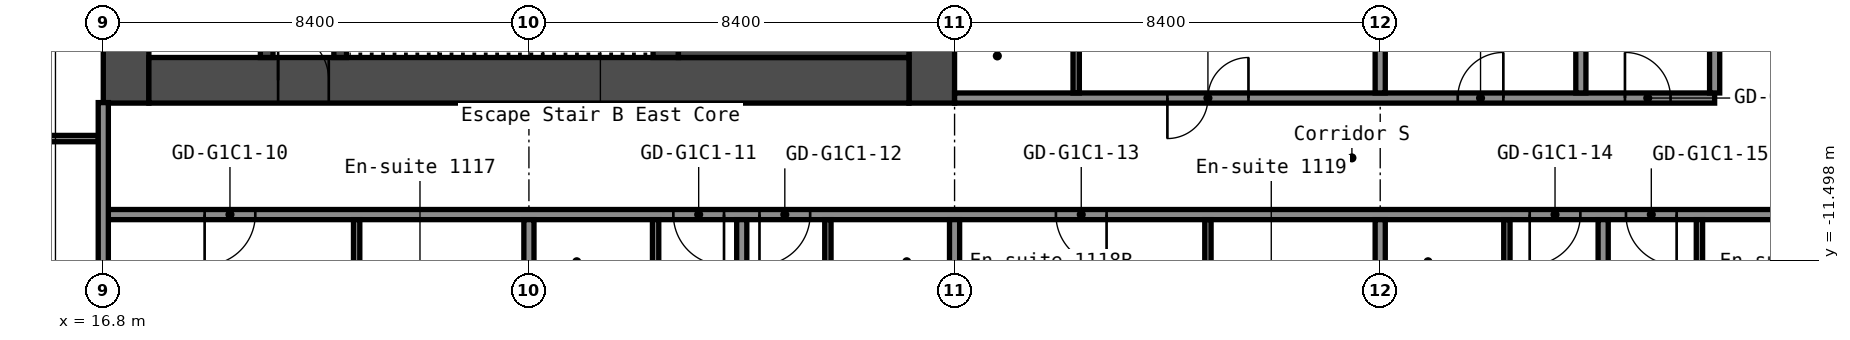
"""IFC4 building model, lengths in metres.
Left out: names, types, materials, properties, quantities, classifications, styles, units other than length and angle.
Written with IfcOpenShell. Run it as: python <this file> out.ifc"""

import sys

from ifc_helpers import new_model, si_unit, direction, frame, frame_2d, origin, place, context, subcontext, project, spatial, rectangle, extrude, element, fill, save


model = new_model("IFC4")
c1 = context("Model", 3, precision=1e-05, world=origin(), true_north=direction((0.0, 1.0)))
c2 = subcontext(c1, "Body", "Model", "MODEL_VIEW")
j1 = project(units=[si_unit("LENGTHUNIT", "METRE"), si_unit("PLANEANGLEUNIT", "RADIAN")], contexts=[c1])
p1 = place(None, origin())
s1 = spatial("IfcSite", under=j1, at=p1, CompositionType="ELEMENT")
p2 = place(p1, origin())
s2 = spatial("IfcBuilding", under=s1, at=p2, CompositionType="ELEMENT")
p3 = place(p2, frame((0.0, 0.0, 42.2)))
s3 = spatial("IfcBuildingStorey", under=s2, at=p3, CompositionType="ELEMENT", Elevation=42.2)
p4 = place(p3, frame((17.25, -8.4, 0.0), z_axis=(0.0, 0.0, 1.0), x_axis=(0.0, 1.0, 0.0)))
e1 = element("IfcWall", 1, at=p4, inside=s3, PredefinedType="SHEAR", context=c2, shape_type="SweptSolid", body=[
    extrude(rectangle(XDim=16.8, YDim=0.9, at=frame_2d((8.4, 0.0))), origin(), (0.0, 0.0, 1.0), 2.8),
])
p5 = place(p4, frame((12.75, 0.0, 0.0)))
e2 = element("IfcOpeningElement", 2, at=p5, cuts=e1, PredefinedType="OPENING", context=c2, shape_type="SweptSolid", body=[
    extrude(rectangle(XDim=1.2, YDim=2.1, at=frame_2d((0.6, 1.05))), frame((0.0, 0.46, 0.0), z_axis=(0.0, -1.0, 0.0), x_axis=(1.0, 0.0, 0.0)), (0.0, 0.0, 1.0), 0.92),
])
p6 = place(p4, frame((2.85, 0.0, 0.0)))
e3 = element("IfcOpeningElement", 3, at=p6, cuts=e1, PredefinedType="OPENING", context=c2, shape_type="SweptSolid", body=[
    extrude(rectangle(XDim=1.2, YDim=2.1, at=frame_2d((0.6, 1.05))), frame((0.0, 0.46, 0.0), z_axis=(0.0, -1.0, 0.0), x_axis=(1.0, 0.0, 0.0)), (0.0, 0.0, 1.0), 0.92),
])
p7 = place(p3, frame((33.15, -8.4, 0.0), z_axis=(0.0, 0.0, 1.0), x_axis=(0.0, 1.0, 0.0)))
e4 = element("IfcWall", 4, at=p7, inside=s3, PredefinedType="SHEAR", context=c2, shape_type="SweptSolid", body=[
    extrude(rectangle(XDim=16.8, YDim=0.9, at=frame_2d((8.4, 0.0))), origin(), (0.0, 0.0, 1.0), 2.8),
])
p8 = place(p3, frame((17.7, -7.95, 0.0), z_axis=(0.0, 0.0, 1.0), x_axis=(1.0, 0.0, 0.0)))
e5 = element("IfcWall", 5, at=p8, inside=s3, PredefinedType="SHEAR", context=c2, shape_type="SweptSolid", body=[
    extrude(rectangle(XDim=15.0, YDim=0.9, at=frame_2d((7.5, 0.0))), origin(), (0.0, 0.0, 1.0), 2.8),
])
p9 = place(p8, frame((2.55, 0.0, 0.0)))
e6 = element("IfcOpeningElement", 6, at=p9, cuts=e5, PredefinedType="OPENING", context=c2, shape_type="SweptSolid", body=[
    extrude(rectangle(XDim=1.0, YDim=2.1, at=frame_2d((0.5, 1.05))), frame((0.0, 0.46, 0.0), z_axis=(0.0, -1.0, 0.0), x_axis=(1.0, 0.0, 0.0)), (0.0, 0.0, 1.0), 0.92),
])
p10 = place(p3, frame((20.025, -7.5, 0.0), z_axis=(0.0, 0.0, 1.0), x_axis=(0.0, 1.0, 0.0)))
e7 = element("IfcWall", 7, at=p10, inside=s3, PredefinedType="SHEAR", context=c2, shape_type="SweptSolid", body=[
    extrude(rectangle(XDim=6.3, YDim=0.25, at=frame_2d((3.15, 0.0))), origin(), (0.0, 0.0, 1.0), 2.8),
])
p11 = place(p10, frame((2.4, 0.0, 0.0)))
e8 = element("IfcOpeningElement", 8, at=p11, cuts=e7, PredefinedType="OPENING", context=c2, shape_type="SweptSolid", body=[
    extrude(rectangle(XDim=1.0, YDim=2.1, at=frame_2d((0.5, 1.05))), frame((0.0, 0.135, 0.0), z_axis=(0.0, -1.0, 0.0), x_axis=(1.0, 0.0, 0.0)), (0.0, 0.0, 1.0), 0.27),
])
p12 = place(p3, frame((21.475, -7.5, 0.0), z_axis=(0.0, 0.0, 1.0), x_axis=(0.0, 1.0, 0.0)))
e9 = element("IfcWall", 9, at=p12, inside=s3, PredefinedType="SHEAR", context=c2, shape_type="SweptSolid", body=[
    extrude(rectangle(XDim=3.75, YDim=0.25, at=frame_2d((1.875, 0.0))), origin(), (0.0, 0.0, 1.0), 2.8),
])
p13 = place(p12, frame((1.3, 0.0, 0.0)))
e10 = element("IfcOpeningElement", 10, at=p13, cuts=e9, PredefinedType="OPENING", context=c2, shape_type="SweptSolid", body=[
    extrude(rectangle(XDim=1.2, YDim=2.1, at=frame_2d((0.6, 1.05))), frame((0.0, 0.135, 0.0), z_axis=(0.0, -1.0, 0.0), x_axis=(1.0, 0.0, 0.0)), (0.0, 0.0, 1.0), 0.27),
])
p14 = place(p3, frame((27.9, -7.5, 0.0), z_axis=(0.0, 0.0, 1.0), x_axis=(0.0, 1.0, 0.0)))
e11 = element("IfcWall", 11, at=p14, inside=s3, PredefinedType="SHEAR", context=c2, shape_type="SweptSolid", body=[
    extrude(rectangle(XDim=3.75, YDim=0.5, at=frame_2d((1.875, 0.0))), origin(), (0.0, 0.0, 1.0), 2.8),
])
p15 = place(p3, frame((28.15, -6.75, 0.0), z_axis=(0.0, 0.0, 1.0), x_axis=(1.0, 0.0, 0.0)))
e12 = element("IfcWall", 12, at=p15, inside=s3, PredefinedType="SHEAR", context=c2, shape_type="SweptSolid", body=[
    extrude(rectangle(XDim=4.55, YDim=1.5, at=frame_2d((2.275, 0.0))), origin(), (0.0, 0.0, 1.0), 2.8),
])
p16 = place(p3, frame((16.8, -10.6, 0.0), z_axis=(0.0, 0.0, 1.0), x_axis=(1.0, 0.0, 0.0)))
e13 = element("IfcWall", 13, at=p16, inside=s3, PredefinedType="PARTITIONING", context=c2, shape_type="SweptSolid", body=[
    extrude(rectangle(XDim=34.3, YDim=0.2, at=frame_2d((17.15, 0.0))), origin(), (0.0, 0.0, 1.0), 2.8),
])
p17 = place(p16, frame((2.0, 0.0, 0.0)))
e14 = element("IfcOpeningElement", 14, at=p17, cuts=e13, PredefinedType="OPENING", context=c2, shape_type="SweptSolid", body=[
    extrude(rectangle(XDim=1.0, YDim=2.1, at=frame_2d((0.5, 1.05))), frame((0.0, 0.11, 0.0), z_axis=(0.0, -1.0, 0.0), x_axis=(1.0, 0.0, 0.0)), (0.0, 0.0, 1.0), 0.22),
])
p18 = place(p16, frame((11.25, 0.0, 0.0)))
e15 = element("IfcOpeningElement", 15, at=p18, cuts=e13, PredefinedType="OPENING", context=c2, shape_type="SweptSolid", body=[
    extrude(rectangle(XDim=1.0, YDim=2.1, at=frame_2d((0.5, 1.05))), frame((0.0, 0.11, 0.0), z_axis=(0.0, -1.0, 0.0), x_axis=(1.0, 0.0, 0.0)), (0.0, 0.0, 1.0), 0.22),
])
p19 = place(p16, frame((12.95, 0.0, 0.0)))
e16 = element("IfcOpeningElement", 16, at=p19, cuts=e13, PredefinedType="OPENING", context=c2, shape_type="SweptSolid", body=[
    extrude(rectangle(XDim=1.0, YDim=2.1, at=frame_2d((0.5, 1.05))), frame((0.0, 0.11, 0.0), z_axis=(0.0, -1.0, 0.0), x_axis=(1.0, 0.0, 0.0)), (0.0, 0.0, 1.0), 0.22),
])
p20 = place(p16, frame((18.8, 0.0, 0.0)))
e17 = element("IfcOpeningElement", 17, at=p20, cuts=e13, PredefinedType="OPENING", context=c2, shape_type="SweptSolid", body=[
    extrude(rectangle(XDim=1.0, YDim=2.1, at=frame_2d((0.5, 1.05))), frame((0.0, 0.11, 0.0), z_axis=(0.0, -1.0, 0.0), x_axis=(1.0, 0.0, 0.0)), (0.0, 0.0, 1.0), 0.22),
])
p21 = place(p16, frame((28.15, 0.0, 0.0)))
e18 = element("IfcOpeningElement", 18, at=p21, cuts=e13, PredefinedType="OPENING", context=c2, shape_type="SweptSolid", body=[
    extrude(rectangle(XDim=1.0, YDim=2.1, at=frame_2d((0.5, 1.05))), frame((0.0, 0.11, 0.0), z_axis=(0.0, -1.0, 0.0), x_axis=(1.0, 0.0, 0.0)), (0.0, 0.0, 1.0), 0.22),
])
p22 = place(p16, frame((30.05, 0.0, 0.0)))
e19 = element("IfcOpeningElement", 19, at=p22, cuts=e13, PredefinedType="OPENING", context=c2, shape_type="SweptSolid", body=[
    extrude(rectangle(XDim=1.0, YDim=2.1, at=frame_2d((0.5, 1.05))), frame((0.0, 0.11, 0.0), z_axis=(0.0, -1.0, 0.0), x_axis=(1.0, 0.0, 0.0)), (0.0, 0.0, 1.0), 0.22),
])
p23 = place(p3, frame((14.363, -9.1, 0.0), z_axis=(0.0, 0.0, 1.0), x_axis=(1.0, 0.0, 0.0)))
e20 = element("IfcWall", 20, at=p23, inside=s3, PredefinedType="PARTITIONING", context=c2, shape_type="SweptSolid", body=[
    extrude(rectangle(XDim=2.337, YDim=0.125, at=frame_2d((1.169, 0.0))), origin(), (0.0, 0.0, 1.0), 2.8),
])
p24 = place(p3, frame((33.6, -8.3, 0.0), z_axis=(0.0, 0.0, 1.0), x_axis=(1.0, 0.0, 0.0)))
e21 = element("IfcWall", 21, at=p24, inside=s3, PredefinedType="PARTITIONING", context=c2, shape_type="SweptSolid", body=[
    extrude(rectangle(XDim=15.0, YDim=0.2, at=frame_2d((7.5, 0.0))), origin(), (0.0, 0.0, 1.0), 2.8),
])
p25 = place(p24, frame((4.2, 0.0, 0.0)))
e22 = element("IfcOpeningElement", 22, at=p25, cuts=e21, PredefinedType="OPENING", context=c2, shape_type="SweptSolid", body=[
    extrude(rectangle(XDim=1.6, YDim=2.1, at=frame_2d((0.8, 1.05))), frame((0.0, 0.11, 0.0), z_axis=(0.0, -1.0, 0.0), x_axis=(1.0, 0.0, 0.0)), (0.0, 0.0, 1.0), 0.22),
])
p26 = place(p24, frame((9.93, 0.0, 0.0)))
e23 = element("IfcOpeningElement", 23, at=p26, cuts=e21, PredefinedType="OPENING", context=c2, shape_type="SweptSolid", body=[
    extrude(rectangle(XDim=0.9, YDim=2.1, at=frame_2d((0.45, 1.05))), frame((0.0, 0.11, 0.0), z_axis=(0.0, -1.0, 0.0), x_axis=(1.0, 0.0, 0.0)), (0.0, 0.0, 1.0), 0.22),
])
p27 = place(p24, frame((13.23, 0.0, 0.0)))
e24 = element("IfcOpeningElement", 24, at=p27, cuts=e21, PredefinedType="OPENING", context=c2, shape_type="SweptSolid", body=[
    extrude(rectangle(XDim=0.9, YDim=2.1, at=frame_2d((0.45, 1.05))), frame((0.0, 0.11, 0.0), z_axis=(0.0, -1.0, 0.0), x_axis=(1.0, 0.0, 0.0)), (0.0, 0.0, 1.0), 0.22),
])
p28 = place(p3, frame((16.8, -20.3, 0.0), z_axis=(0.0, 0.0, 1.0), x_axis=(0.0, 1.0, 0.0)))
e25 = element("IfcWall", 25, at=p28, inside=s3, PredefinedType="PARTITIONING", context=c2, shape_type="SweptSolid", body=[
    extrude(rectangle(XDim=11.91, YDim=0.2, at=frame_2d((5.955, 0.0))), origin(), (0.0, 0.0, 1.0), 2.8),
])
p29 = place(p3, frame((21.8, -14.0, 0.0), z_axis=(0.0, 0.0, 1.0), x_axis=(0.0, 1.0, 0.0)))
e26 = element("IfcWall", 26, at=p29, inside=s3, PredefinedType="PARTITIONING", context=c2, shape_type="SweptSolid", body=[
    extrude(rectangle(XDim=3.3, YDim=0.125, at=frame_2d((1.65, 0.0))), origin(), (0.0, 0.0, 1.0), 2.8),
])
p30 = place(p3, frame((25.2, -20.3, 0.0), z_axis=(0.0, 0.0, 1.0), x_axis=(0.0, 1.0, 0.0)))
e27 = element("IfcWall", 27, at=p30, inside=s3, PredefinedType="PARTITIONING", context=c2, shape_type="SweptSolid", body=[
    extrude(rectangle(XDim=9.6, YDim=0.2, at=frame_2d((4.8, 0.0))), origin(), (0.0, 0.0, 1.0), 2.8),
])
p31 = place(p3, frame((27.7, -13.6, 0.0), z_axis=(0.0, 0.0, 1.0), x_axis=(0.0, 1.0, 0.0)))
e28 = element("IfcWall", 28, at=p31, inside=s3, PredefinedType="PARTITIONING", context=c2, shape_type="SweptSolid", body=[
    extrude(rectangle(XDim=2.9, YDim=0.125, at=frame_2d((1.45, 0.0))), origin(), (0.0, 0.0, 1.0), 2.8),
])
p32 = place(p31, frame((0.6, 0.0, 0.0)))
e29 = element("IfcOpeningElement", 29, at=p32, cuts=e28, PredefinedType="OPENING", context=c2, shape_type="SweptSolid", body=[
    extrude(rectangle(XDim=0.8, YDim=2.1, at=frame_2d((0.4, 1.05))), frame((0.0, 0.073, 0.0), z_axis=(0.0, -1.0, 0.0), x_axis=(1.0, 0.0, 0.0)), (0.0, 0.0, 1.0), 0.145),
])
p33 = place(p3, frame((29.4, -20.3, 0.0), z_axis=(0.0, 0.0, 1.0), x_axis=(0.0, 1.0, 0.0)))
e30 = element("IfcWall", 30, at=p33, inside=s3, PredefinedType="PARTITIONING", context=c2, shape_type="SweptSolid", body=[
    extrude(rectangle(XDim=9.6, YDim=0.2, at=frame_2d((4.8, 0.0))), origin(), (0.0, 0.0, 1.0), 2.8),
])
p34 = place(p3, frame((31.1, -13.6, 0.0), z_axis=(0.0, 0.0, 1.0), x_axis=(0.0, 1.0, 0.0)))
e31 = element("IfcWall", 31, at=p34, inside=s3, PredefinedType="PARTITIONING", context=c2, shape_type="SweptSolid", body=[
    extrude(rectangle(XDim=2.9, YDim=0.125, at=frame_2d((1.45, 0.0))), origin(), (0.0, 0.0, 1.0), 2.8),
])
p35 = place(p34, frame((0.6, 0.0, 0.0)))
e32 = element("IfcOpeningElement", 32, at=p35, cuts=e31, PredefinedType="OPENING", context=c2, shape_type="SweptSolid", body=[
    extrude(rectangle(XDim=0.8, YDim=2.1, at=frame_2d((0.4, 1.05))), frame((0.0, 0.073, 0.0), z_axis=(0.0, -1.0, 0.0), x_axis=(1.0, 0.0, 0.0)), (0.0, 0.0, 1.0), 0.145),
])
p36 = place(p3, frame((33.6, -20.3, 0.0), z_axis=(0.0, 0.0, 1.0), x_axis=(0.0, 1.0, 0.0)))
e33 = element("IfcWall", 33, at=p36, inside=s3, PredefinedType="PARTITIONING", context=c2, shape_type="SweptSolid", body=[
    extrude(rectangle(XDim=9.6, YDim=0.2, at=frame_2d((4.8, 0.0))), origin(), (0.0, 0.0, 1.0), 2.8),
])
p37 = place(p3, frame((36.0, -8.2, 0.0), z_axis=(0.0, 0.0, 1.0), x_axis=(0.0, 1.0, 0.0)))
e34 = element("IfcWall", 34, at=p37, inside=s3, PredefinedType="PARTITIONING", context=c2, shape_type="SweptSolid", body=[
    extrude(rectangle(XDim=2.5, YDim=0.125, at=frame_2d((1.25, 0.0))), origin(), (0.0, 0.0, 1.0), 2.8),
])
p38 = place(p37, frame((1.05, 0.0, 0.0)))
e35 = element("IfcOpeningElement", 35, at=p38, cuts=e34, PredefinedType="OPENING", context=c2, shape_type="SweptSolid", body=[
    extrude(rectangle(XDim=0.9, YDim=2.1, at=frame_2d((0.45, 1.05))), frame((0.0, 0.073, 0.0), z_axis=(0.0, -1.0, 0.0), x_axis=(1.0, 0.0, 0.0)), (0.0, 0.0, 1.0), 0.145),
])
p39 = place(p3, frame((38.6, -14.0, 0.0), z_axis=(0.0, 0.0, 1.0), x_axis=(0.0, 1.0, 0.0)))
e36 = element("IfcWall", 36, at=p39, inside=s3, PredefinedType="PARTITIONING", context=c2, shape_type="SweptSolid", body=[
    extrude(rectangle(XDim=3.3, YDim=0.125, at=frame_2d((1.65, 0.0))), origin(), (0.0, 0.0, 1.0), 2.8),
])
p40 = place(p3, frame((42.0, -20.3, 0.0), z_axis=(0.0, 0.0, 1.0), x_axis=(0.0, 1.0, 0.0)))
e37 = element("IfcWall", 37, at=p40, inside=s3, PredefinedType="PARTITIONING", context=c2, shape_type="SweptSolid", body=[
    extrude(rectangle(XDim=9.6, YDim=0.2, at=frame_2d((4.8, 0.0))), origin(), (0.0, 0.0, 1.0), 2.8),
])
p41 = place(p3, frame((42.0, -8.2, 0.0), z_axis=(0.0, 0.0, 1.0), x_axis=(0.0, 1.0, 0.0)))
e38 = element("IfcWall", 38, at=p41, inside=s3, PredefinedType="PARTITIONING", context=c2, shape_type="SweptSolid", body=[
    extrude(rectangle(XDim=8.2, YDim=0.2, at=frame_2d((4.1, 0.0))), origin(), (0.0, 0.0, 1.0), 2.8),
])
p42 = place(p3, frame((44.5, -13.6, 0.0), z_axis=(0.0, 0.0, 1.0), x_axis=(0.0, 1.0, 0.0)))
e39 = element("IfcWall", 39, at=p42, inside=s3, PredefinedType="PARTITIONING", context=c2, shape_type="SweptSolid", body=[
    extrude(rectangle(XDim=2.9, YDim=0.125, at=frame_2d((1.45, 0.0))), origin(), (0.0, 0.0, 1.0), 2.8),
])
p43 = place(p42, frame((0.6, 0.0, 0.0)))
e40 = element("IfcOpeningElement", 40, at=p43, cuts=e39, PredefinedType="OPENING", context=c2, shape_type="SweptSolid", body=[
    extrude(rectangle(XDim=0.8, YDim=2.1, at=frame_2d((0.4, 1.05))), frame((0.0, 0.073, 0.0), z_axis=(0.0, -1.0, 0.0), x_axis=(1.0, 0.0, 0.0)), (0.0, 0.0, 1.0), 0.145),
])
p44 = place(p3, frame((45.96, -8.2, 0.0), z_axis=(0.0, 0.0, 1.0), x_axis=(0.0, 1.0, 0.0)))
e41 = element("IfcWall", 41, at=p44, inside=s3, PredefinedType="PARTITIONING", context=c2, shape_type="SweptSolid", body=[
    extrude(rectangle(XDim=8.2, YDim=0.2, at=frame_2d((4.1, 0.0))), origin(), (0.0, 0.0, 1.0), 2.8),
])
p45 = place(p3, frame((46.4, -20.3, 0.0), z_axis=(0.0, 0.0, 1.0), x_axis=(0.0, 1.0, 0.0)))
e42 = element("IfcWall", 42, at=p45, inside=s3, PredefinedType="PARTITIONING", context=c2, shape_type="SweptSolid", body=[
    extrude(rectangle(XDim=9.6, YDim=0.2, at=frame_2d((4.8, 0.0))), origin(), (0.0, 0.0, 1.0), 2.8),
])
p46 = place(p3, frame((48.3, -13.6, 0.0), z_axis=(0.0, 0.0, 1.0), x_axis=(0.0, 1.0, 0.0)))
e43 = element("IfcWall", 43, at=p46, inside=s3, PredefinedType="PARTITIONING", context=c2, shape_type="SweptSolid", body=[
    extrude(rectangle(XDim=2.9, YDim=0.125, at=frame_2d((1.45, 0.0))), origin(), (0.0, 0.0, 1.0), 2.8),
])
p47 = place(p46, frame((0.6, 0.0, 0.0)))
e44 = element("IfcOpeningElement", 44, at=p47, cuts=e43, PredefinedType="OPENING", context=c2, shape_type="SweptSolid", body=[
    extrude(rectangle(XDim=0.8, YDim=2.1, at=frame_2d((0.4, 1.05))), frame((0.0, 0.073, 0.0), z_axis=(0.0, -1.0, 0.0), x_axis=(1.0, 0.0, 0.0)), (0.0, 0.0, 1.0), 0.145),
])
p48 = place(p3, frame((48.6, -8.2, 0.0), z_axis=(0.0, 0.0, 1.0), x_axis=(0.0, 1.0, 0.0)))
e45 = element("IfcWall", 45, at=p48, inside=s3, PredefinedType="PARTITIONING", context=c2, shape_type="SweptSolid", body=[
    extrude(rectangle(XDim=16.4, YDim=0.2, at=frame_2d((8.2, 0.0))), origin(), (0.0, 0.0, 1.0), 2.8),
])
p49 = place(p9, origin())
e46 = element("IfcDoor", 46, at=p49, inside=s3, OperationType="SINGLE_SWING_RIGHT", PredefinedType="DOOR", context=c2, shape_type="SweptSolid", body=[
    extrude(rectangle(XDim=1.0, YDim=2.1, at=frame_2d((0.5, 1.05))), frame((0.0, 0.025, 0.0), z_axis=(0.0, -1.0, 0.0), x_axis=(1.0, 0.0, 0.0)), (0.0, 0.0, 1.0), 0.05),
])
fill(e6, e46)
p50 = place(p17, origin())
e47 = element("IfcDoor", 47, at=p50, inside=s3, OperationType="SINGLE_SWING_LEFT", PredefinedType="DOOR", context=c2, shape_type="SweptSolid", body=[
    extrude(rectangle(XDim=1.0, YDim=2.1, at=frame_2d((0.5, 1.05))), frame((0.0, 0.025, 0.0), z_axis=(0.0, -1.0, 0.0), x_axis=(1.0, 0.0, 0.0)), (0.0, 0.0, 1.0), 0.05),
])
fill(e14, e47)
p51 = place(p18, origin())
e48 = element("IfcDoor", 48, at=p51, inside=s3, OperationType="SINGLE_SWING_RIGHT", PredefinedType="DOOR", context=c2, shape_type="SweptSolid", body=[
    extrude(rectangle(XDim=1.0, YDim=2.1, at=frame_2d((0.5, 1.05))), frame((0.0, 0.025, 0.0), z_axis=(0.0, -1.0, 0.0), x_axis=(1.0, 0.0, 0.0)), (0.0, 0.0, 1.0), 0.05),
])
fill(e15, e48)
p52 = place(p19, origin())
e49 = element("IfcDoor", 49, at=p52, inside=s3, OperationType="SINGLE_SWING_LEFT", PredefinedType="DOOR", context=c2, shape_type="SweptSolid", body=[
    extrude(rectangle(XDim=1.0, YDim=2.1, at=frame_2d((0.5, 1.05))), frame((0.0, 0.025, 0.0), z_axis=(0.0, -1.0, 0.0), x_axis=(1.0, 0.0, 0.0)), (0.0, 0.0, 1.0), 0.05),
])
fill(e16, e49)
p53 = place(p20, origin())
e50 = element("IfcDoor", 50, at=p53, inside=s3, OperationType="SINGLE_SWING_RIGHT", PredefinedType="DOOR", context=c2, shape_type="SweptSolid", body=[
    extrude(rectangle(XDim=1.0, YDim=2.1, at=frame_2d((0.5, 1.05))), frame((0.0, 0.025, 0.0), z_axis=(0.0, -1.0, 0.0), x_axis=(1.0, 0.0, 0.0)), (0.0, 0.0, 1.0), 0.05),
])
fill(e17, e50)
p54 = place(p21, origin())
e51 = element("IfcDoor", 51, at=p54, inside=s3, OperationType="SINGLE_SWING_LEFT", PredefinedType="DOOR", context=c2, shape_type="SweptSolid", body=[
    extrude(rectangle(XDim=1.0, YDim=2.1, at=frame_2d((0.5, 1.05))), frame((0.0, 0.025, 0.0), z_axis=(0.0, -1.0, 0.0), x_axis=(1.0, 0.0, 0.0)), (0.0, 0.0, 1.0), 0.05),
])
fill(e18, e51)
p55 = place(p22, origin())
e52 = element("IfcDoor", 52, at=p55, inside=s3, OperationType="SINGLE_SWING_RIGHT", PredefinedType="DOOR", context=c2, shape_type="SweptSolid", body=[
    extrude(rectangle(XDim=1.0, YDim=2.1, at=frame_2d((0.5, 1.05))), frame((0.0, 0.025, 0.0), z_axis=(0.0, -1.0, 0.0), x_axis=(1.0, 0.0, 0.0)), (0.0, 0.0, 1.0), 0.05),
])
fill(e19, e52)
p56 = place(p25, origin())
e53 = element("IfcDoor", 53, at=p56, inside=s3, OperationType="DOUBLE_DOOR_SINGLE_SWING", PredefinedType="DOOR", context=c2, shape_type="SweptSolid", body=[
    extrude(rectangle(XDim=1.6, YDim=2.1, at=frame_2d((0.8, 1.05))), frame((0.0, 0.025, 0.0), z_axis=(0.0, -1.0, 0.0), x_axis=(1.0, 0.0, 0.0)), (0.0, 0.0, 1.0), 0.05),
])
fill(e22, e53)
p57 = place(p26, origin())
e54 = element("IfcDoor", 54, at=p57, inside=s3, OperationType="SINGLE_SWING_LEFT", PredefinedType="DOOR", context=c2, shape_type="SweptSolid", body=[
    extrude(rectangle(XDim=0.9, YDim=2.1, at=frame_2d((0.45, 1.05))), frame((0.0, 0.025, 0.0), z_axis=(0.0, -1.0, 0.0), x_axis=(1.0, 0.0, 0.0)), (0.0, 0.0, 1.0), 0.05),
])
fill(e23, e54)
p58 = place(p27, origin())
e55 = element("IfcDoor", 55, at=p58, inside=s3, OperationType="SINGLE_SWING_RIGHT", PredefinedType="DOOR", context=c2, shape_type="SweptSolid", body=[
    extrude(rectangle(XDim=0.9, YDim=2.1, at=frame_2d((0.45, 1.05))), frame((0.0, 0.025, 0.0), z_axis=(0.0, -1.0, 0.0), x_axis=(1.0, 0.0, 0.0)), (0.0, 0.0, 1.0), 0.05),
])
fill(e24, e55)
save(model, sys.argv[1])
